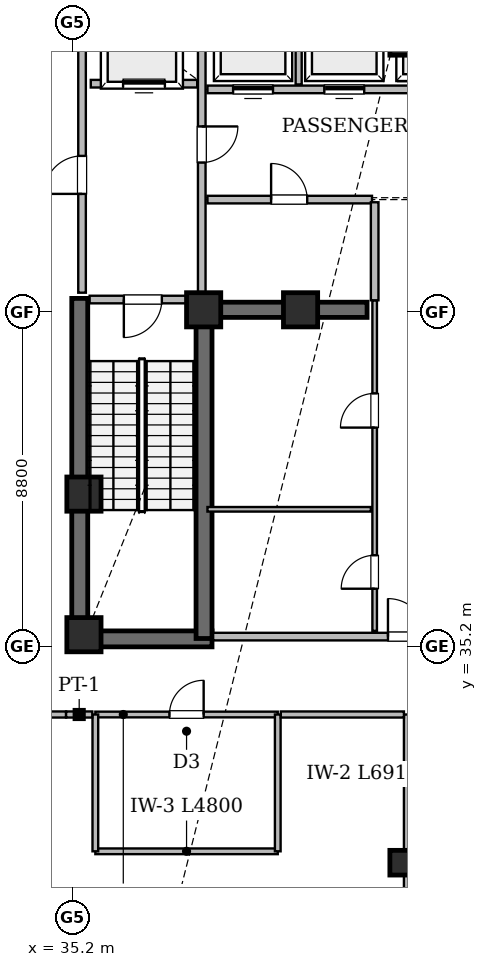
"""IFC4 building model, lengths in metres.
Left out: names, types, materials, properties, quantities, classifications, styles, units other than length and angle.
Written with IfcOpenShell. Run it as: python <this file> out.ifc"""

import sys

from ifc_helpers import new_model, si_unit, direction, frame, frame_2d, origin, origin_2d, place, context, subcontext, project, spatial, rectangle, extrude, element, fill, save


model = new_model("IFC4")
c1 = context("Model", 3, precision=1e-05, world=origin(), true_north=direction((0.0, 1.0)))
c2 = subcontext(c1, "Body", "Model", "MODEL_VIEW")
j1 = project(units=[si_unit("LENGTHUNIT", "METRE"), si_unit("PLANEANGLEUNIT", "RADIAN")], contexts=[c1])
p1 = place(None, origin())
s1 = spatial("IfcSite", under=j1, at=p1, CompositionType="ELEMENT")
p2 = place(p1, origin())
s2 = spatial("IfcBuilding", under=s1, at=p2, CompositionType="ELEMENT")
p3 = place(p2, frame((0.0, 0.0, 295.4)))
s3 = spatial("IfcBuildingStorey", under=s2, at=p3, CompositionType="ELEMENT", Elevation=295.4)
p4 = place(p3, frame((35.18, 35.39, 0.0), z_axis=(0.0, 0.0, 1.0), x_axis=(1.0, 0.0, 0.0)))
e1 = element("IfcWall", 1, at=p4, inside=s3, PredefinedType="SHEAR", context=c2, shape_type="SweptSolid", body=[
    extrude(rectangle(XDim=3.69, YDim=0.42, at=frame_2d((1.845, 0.0))), origin(), (0.0, 0.0, 1.0), 5.14),
])
p5 = place(p3, frame((35.39, 35.18, 0.0), z_axis=(0.0, 0.0, 1.0), x_axis=(0.0, 1.0, 0.0)))
e2 = element("IfcWall", 2, at=p5, inside=s3, PredefinedType="SHEAR", context=c2, shape_type="SweptSolid", body=[
    extrude(rectangle(XDim=9.17, YDim=0.42, at=frame_2d((4.585, 0.0))), origin(), (0.0, 0.0, 1.0), 5.14),
])
p6 = place(p3, frame((38.66, 35.4, 0.0), z_axis=(0.0, 0.0, 1.0), x_axis=(0.0, 1.0, 0.0)))
e3 = element("IfcWall", 3, at=p6, inside=s3, PredefinedType="SHEAR", context=c2, shape_type="SweptSolid", body=[
    extrude(rectangle(XDim=8.95, YDim=0.42, at=frame_2d((4.475, 0.0))), origin(), (0.0, 0.0, 1.0), 5.14),
])
p7 = place(p3, frame((44.0, 50.1, 0.0), z_axis=(0.0, 0.0, 1.0), x_axis=(0.0, 1.0, 0.0)))
e4 = element("IfcWall", 4, at=p7, inside=s3, PredefinedType="SHEAR", context=c2, shape_type="SweptSolid", body=[
    extrude(rectangle(XDim=2.1, YDim=0.4, at=frame_2d((1.05, 0.0))), origin(), (0.0, 0.0, 1.0), 5.14),
])
p8 = place(p3, frame((38.75, 44.05, 0.0), z_axis=(0.0, 0.0, 1.0), x_axis=(1.0, 0.0, 0.0)))
e5 = element("IfcWall", 5, at=p8, inside=s3, PredefinedType="SHEAR", context=c2, shape_type="SweptSolid", body=[
    extrude(rectangle(XDim=4.2, YDim=0.4, at=frame_2d((2.1, 0.0))), origin(), (0.0, 0.0, 1.0), 5.14),
])
for number, where, z_axis, x_axis in (
    (6, (35.5, 35.5, 0.0), (0.0, 0.0, 1.0), (1.0, 0.0, 0.0)),
    (7, (38.65, 44.05, 0.0), (0.0, 0.0, 1.0), (1.0, 0.0, 0.0)),
    (8, (44.0, 51.2, 0.0), (0.0, 0.0, 1.0), (1.0, 0.0, 0.0)),
    (9, (35.5, 39.2, 0.0), (0.0, 0.0, 1.0), (1.0, 0.0, 0.0)),
    (10, (41.2, 44.05, 0.0), (0.0, 0.0, 1.0), (1.0, 0.0, 0.0)),
):
    element("IfcColumn", number, at=place(p3, frame(where, z_axis=z_axis, x_axis=x_axis)), inside=s3, PredefinedType="COLUMN", context=c2, shape_type="SweptSolid", body=[
        extrude(rectangle(XDim=0.9, YDim=0.9, at=origin_2d()), origin(), (0.0, 0.0, 1.0), 5.4),
    ])
p9 = place(p3, frame((44.0, 29.5, 0.0), z_axis=(0.0, 0.0, 1.0), x_axis=(1.0, 0.0, 0.0)))
e11 = element("IfcColumn", 11, at=p9, inside=s3, PredefinedType="COLUMN", context=c2, shape_type="SweptSolid", body=[
    extrude(rectangle(XDim=0.9, YDim=0.65, at=origin_2d()), origin(), (0.0, 0.0, 1.0), 5.4),
])
p10 = place(p3, frame((38.9, 35.45, 0.0), z_axis=(0.0, 0.0, 1.0), x_axis=(1.0, 0.0, 0.0)))
e12 = element("IfcWall", 12, at=p10, inside=s3, PredefinedType="SOLIDWALL", context=c2, shape_type="SweptSolid", body=[
    extrude(rectangle(XDim=10.2, YDim=0.2, at=frame_2d((5.1, 0.0))), origin(), (0.0, 0.0, 1.0), 5.14),
])
p11 = place(p10, frame((4.6, 0.0, 0.0)))
e13 = element("IfcOpeningElement", 13, at=p11, cuts=e12, PredefinedType="OPENING", context=c2, shape_type="SweptSolid", body=[
    extrude(rectangle(XDim=1.0, YDim=2.15, at=frame_2d((0.5, 1.075))), frame((0.0, 0.11, 0.0), z_axis=(0.0, -1.0, 0.0), x_axis=(1.0, 0.0, 0.0)), (0.0, 0.0, 1.0), 0.22),
])
p12 = place(p3, frame((43.15, 35.6, 0.0), z_axis=(0.0, 0.0, 1.0), x_axis=(0.0, 1.0, 0.0)))
e14 = element("IfcWall", 14, at=p12, inside=s3, PredefinedType="PARTITIONING", context=c2, shape_type="SweptSolid", body=[
    extrude(rectangle(XDim=8.7, YDim=0.12, at=frame_2d((4.35, 0.0))), origin(), (0.0, 0.0, 1.0), 5.14),
])
p13 = place(p12, frame((1.11, 0.0, 0.0)))
e15 = element("IfcOpeningElement", 15, at=p13, cuts=e14, PredefinedType="OPENING", context=c2, shape_type="SweptSolid", body=[
    extrude(rectangle(XDim=0.88, YDim=2.1, at=frame_2d((0.44, 1.05))), frame((0.0, 0.07, 0.0), z_axis=(0.0, -1.0, 0.0), x_axis=(1.0, 0.0, 0.0)), (0.0, 0.0, 1.0), 0.14),
])
p14 = place(p12, frame((5.35, 0.0, 0.0)))
e16 = element("IfcOpeningElement", 16, at=p14, cuts=e14, PredefinedType="OPENING", context=c2, shape_type="SweptSolid", body=[
    extrude(rectangle(XDim=0.9, YDim=2.1, at=frame_2d((0.45, 1.05))), frame((0.0, 0.07, 0.0), z_axis=(0.0, -1.0, 0.0), x_axis=(1.0, 0.0, 0.0)), (0.0, 0.0, 1.0), 0.14),
])
p15 = place(p3, frame((35.45, 44.5, 0.0), z_axis=(0.0, 0.0, 1.0), x_axis=(0.0, 1.0, 0.0)))
e17 = element("IfcWall", 17, at=p15, inside=s3, PredefinedType="SOLIDWALL", context=c2, shape_type="SweptSolid", body=[
    extrude(rectangle(XDim=7.92, YDim=0.2, at=frame_2d((3.96, 0.0))), origin(), (0.0, 0.0, 1.0), 5.14),
])
p16 = place(p15, frame((2.6, 0.0, 0.0)))
e18 = element("IfcOpeningElement", 18, at=p16, cuts=e17, PredefinedType="OPENING", context=c2, shape_type="SweptSolid", body=[
    extrude(rectangle(XDim=1.0, YDim=2.15, at=frame_2d((0.5, 1.075))), frame((0.0, 0.11, 0.0), z_axis=(0.0, -1.0, 0.0), x_axis=(1.0, 0.0, 0.0)), (0.0, 0.0, 1.0), 0.22),
])
p17 = place(p3, frame((38.6, 44.5, 0.0), z_axis=(0.0, 0.0, 1.0), x_axis=(0.0, 1.0, 0.0)))
e19 = element("IfcWall", 19, at=p17, inside=s3, PredefinedType="SOLIDWALL", context=c2, shape_type="SweptSolid", body=[
    extrude(rectangle(XDim=7.92, YDim=0.2, at=frame_2d((3.96, 0.0))), origin(), (0.0, 0.0, 1.0), 5.14),
])
p18 = place(p17, frame((3.425, 0.0, 0.0)))
e20 = element("IfcOpeningElement", 20, at=p18, cuts=e19, PredefinedType="OPENING", context=c2, shape_type="SweptSolid", body=[
    extrude(rectangle(XDim=0.95, YDim=2.15, at=frame_2d((0.475, 1.075))), frame((0.0, 0.11, 0.0), z_axis=(0.0, -1.0, 0.0), x_axis=(1.0, 0.0, 0.0)), (0.0, 0.0, 1.0), 0.22),
])
p19 = place(p3, frame((38.75, 49.85, 0.0), z_axis=(0.0, 0.0, 1.0), x_axis=(1.0, 0.0, 0.0)))
e21 = element("IfcWall", 21, at=p19, inside=s3, PredefinedType="SOLIDWALL", context=c2, shape_type="SweptSolid", body=[
    extrude(rectangle(XDim=5.5, YDim=0.2, at=frame_2d((2.75, 0.0))), origin(), (0.0, 0.0, 1.0), 5.14),
])
p20 = place(p19, frame((0.675, 0.0, 0.0)))
e22 = element("IfcOpeningElement", 22, at=p20, cuts=e21, PredefinedType="OPENING", context=c2, shape_type="SweptSolid", body=[
    extrude(rectangle(XDim=1.05, YDim=2.15, at=frame_2d((0.525, 1.075))), frame((0.0, 0.11, 0.0), z_axis=(0.0, -1.0, 0.0), x_axis=(1.0, 0.0, 0.0)), (0.0, 0.0, 1.0), 0.22),
])
p21 = place(p19, frame((3.075, 0.0, 0.0)))
e23 = element("IfcOpeningElement", 23, at=p21, cuts=e21, PredefinedType="OPENING", context=c2, shape_type="SweptSolid", body=[
    extrude(rectangle(XDim=1.05, YDim=2.15, at=frame_2d((0.525, 1.075))), frame((0.0, 0.11, 0.0), z_axis=(0.0, -1.0, 0.0), x_axis=(1.0, 0.0, 0.0)), (0.0, 0.0, 1.0), 0.22),
])
p22 = place(p3, frame((35.8, 33.4, 0.0), z_axis=(0.0, 0.0, 1.0), x_axis=(1.0, 0.0, 0.0)))
e24 = element("IfcWall", 24, at=p22, inside=s3, PredefinedType="PLUMBINGWALL", context=c2, shape_type="SweptSolid", body=[
    extrude(rectangle(XDim=4.8, YDim=0.15, at=frame_2d((2.4, 0.0))), origin(), (0.0, 0.0, 1.0), 4.54),
])
p23 = place(p22, frame((1.95, 0.0, 0.0)))
e25 = element("IfcOpeningElement", 25, at=p23, cuts=e24, PredefinedType="OPENING", context=c2, shape_type="SweptSolid", body=[
    extrude(rectangle(XDim=0.9, YDim=2.1, at=frame_2d((0.45, 1.05))), frame((0.0, 0.085, 0.0), z_axis=(0.0, -1.0, 0.0), x_axis=(1.0, 0.0, 0.0)), (0.0, 0.0, 1.0), 0.17),
])
p24 = place(p3, frame((38.75, 46.95, 0.0), z_axis=(0.0, 0.0, 1.0), x_axis=(1.0, 0.0, 0.0)))
e26 = element("IfcWall", 26, at=p24, inside=s3, PredefinedType="SOLIDWALL", context=c2, shape_type="SweptSolid", body=[
    extrude(rectangle(XDim=4.33, YDim=0.2, at=frame_2d((2.165, 0.0))), origin(), (0.0, 0.0, 1.0), 5.14),
])
p25 = place(p24, frame((1.675, 0.0, 0.0)))
e27 = element("IfcOpeningElement", 27, at=p25, cuts=e26, PredefinedType="OPENING", context=c2, shape_type="SweptSolid", body=[
    extrude(rectangle(XDim=0.95, YDim=2.1, at=frame_2d((0.475, 1.05))), frame((0.0, 0.11, 0.0), z_axis=(0.0, -1.0, 0.0), x_axis=(1.0, 0.0, 0.0)), (0.0, 0.0, 1.0), 0.22),
])
p26 = place(p3, frame((35.65, 44.32, 0.0), z_axis=(0.0, 0.0, 1.0), x_axis=(1.0, 0.0, 0.0)))
e28 = element("IfcWall", 28, at=p26, inside=s3, PredefinedType="SOLIDWALL", context=c2, shape_type="SweptSolid", body=[
    extrude(rectangle(XDim=2.8, YDim=0.2, at=frame_2d((1.4, 0.0))), origin(), (0.0, 0.0, 1.0), 5.14),
])
p27 = place(p26, frame((0.9, 0.0, 0.0)))
e29 = element("IfcOpeningElement", 29, at=p27, cuts=e28, PredefinedType="OPENING", context=c2, shape_type="SweptSolid", body=[
    extrude(rectangle(XDim=1.0, YDim=2.15, at=frame_2d((0.5, 1.075))), frame((0.0, 0.11, 0.0), z_axis=(0.0, -1.0, 0.0), x_axis=(1.0, 0.0, 0.0)), (0.0, 0.0, 1.0), 0.22),
])
p28 = place(p3, frame((35.68, 50.0, 0.0), z_axis=(0.0, 0.0, 1.0), x_axis=(1.0, 0.0, 0.0)))
e30 = element("IfcWall", 30, at=p28, inside=s3, PredefinedType="SOLIDWALL", context=c2, shape_type="SweptSolid", body=[
    extrude(rectangle(XDim=2.8, YDim=0.2, at=frame_2d((1.4, 0.0))), origin(), (0.0, 0.0, 1.0), 5.14),
])
p29 = place(p28, frame((0.85, 0.0, 0.0)))
e31 = element("IfcOpeningElement", 31, at=p29, cuts=e30, PredefinedType="OPENING", context=c2, shape_type="SweptSolid", body=[
    extrude(rectangle(XDim=1.1, YDim=2.15, at=frame_2d((0.55, 1.075))), frame((0.0, 0.11, 0.0), z_axis=(0.0, -1.0, 0.0), x_axis=(1.0, 0.0, 0.0)), (0.0, 0.0, 1.0), 0.22),
])
p30 = place(p3, frame((44.0, 26.49, 0.0), z_axis=(0.0, 0.0, 1.0), x_axis=(0.0, 1.0, 0.0)))
e32 = element("IfcWall", 32, at=p30, inside=s3, PredefinedType="SOLIDWALL", context=c2, shape_type="SweptSolid", body=[
    extrude(rectangle(XDim=6.91, YDim=0.16, at=frame_2d((3.455, 0.0))), origin(), (0.0, 0.0, 1.0), 4.54),
])
p31 = place(p3, frame((35.8, 29.8, 0.0), z_axis=(0.0, 0.0, 1.0), x_axis=(1.0, 0.0, 0.0)))
e33 = element("IfcWall", 33, at=p31, inside=s3, PredefinedType="PLUMBINGWALL", context=c2, shape_type="SweptSolid", body=[
    extrude(rectangle(XDim=4.8, YDim=0.15, at=frame_2d((2.4, 0.0))), origin(), (0.0, 0.0, 1.0), 5.14),
])
p32 = place(p3, frame((38.75, 38.8, 0.0), z_axis=(0.0, 0.0, 1.0), x_axis=(1.0, 0.0, 0.0)))
e34 = element("IfcWall", 34, at=p32, inside=s3, PredefinedType="PARTITIONING", context=c2, shape_type="SweptSolid", body=[
    extrude(rectangle(XDim=4.3, YDim=0.12, at=frame_2d((2.15, 0.0))), origin(), (0.0, 0.0, 1.0), 5.14),
])
p33 = place(p3, frame((35.8, 33.4, 0.0), z_axis=(0.0, 0.0, 1.0), x_axis=(0.0, -1.0, 0.0)))
e35 = element("IfcWall", 35, at=p33, inside=s3, PredefinedType="PLUMBINGWALL", context=c2, shape_type="SweptSolid", body=[
    extrude(rectangle(XDim=3.6, YDim=0.15, at=frame_2d((1.8, 0.0))), origin(), (0.0, 0.0, 1.0), 5.14),
])
p34 = place(p3, frame((40.6, 29.8, 0.0), z_axis=(0.0, 0.0, 1.0), x_axis=(0.0, 1.0, 0.0)))
e36 = element("IfcWall", 36, at=p34, inside=s3, PredefinedType="PLUMBINGWALL", context=c2, shape_type="SweptSolid", body=[
    extrude(rectangle(XDim=3.6, YDim=0.15, at=frame_2d((1.8, 0.0))), origin(), (0.0, 0.0, 1.0), 4.54),
])
p35 = place(p3, frame((40.68, 33.4, 0.0), z_axis=(0.0, 0.0, 1.0), x_axis=(1.0, 0.0, 0.0)))
e37 = element("IfcWall", 37, at=p35, inside=s3, PredefinedType="SOLIDWALL", context=c2, shape_type="SweptSolid", body=[
    extrude(rectangle(XDim=3.24, YDim=0.16, at=frame_2d((1.62, 0.0))), origin(), (0.0, 0.0, 1.0), 5.14),
])
p36 = place(p3, frame((43.15, 44.3, 0.0), z_axis=(0.0, 0.0, 1.0), x_axis=(0.0, 1.0, 0.0)))
e38 = element("IfcWall", 38, at=p36, inside=s3, PredefinedType="SOLIDWALL", context=c2, shape_type="SweptSolid", body=[
    extrude(rectangle(XDim=2.58, YDim=0.2, at=frame_2d((1.29, 0.0))), origin(), (0.0, 0.0, 1.0), 5.14),
])
p37 = place(p3, frame((41.15, 49.98, 0.0), z_axis=(0.0, 0.0, 1.0), x_axis=(0.0, 1.0, 0.0)))
e39 = element("IfcWall", 39, at=p37, inside=s3, PredefinedType="SOLIDWALL", context=c2, shape_type="SweptSolid", body=[
    extrude(rectangle(XDim=2.37, YDim=0.16, at=frame_2d((1.185, 0.0))), origin(), (0.0, 0.0, 1.0), 5.14),
])
p38 = place(p3, frame((33.48, 33.4, 0.0), z_axis=(0.0, 0.0, 1.0), x_axis=(1.0, 0.0, 0.0)))
e40 = element("IfcWall", 40, at=p38, inside=s3, PredefinedType="SOLIDWALL", context=c2, shape_type="SweptSolid", body=[
    extrude(rectangle(XDim=1.55, YDim=0.16, at=frame_2d((0.775, 0.0))), origin(), (0.0, 0.0, 1.0), 5.14),
])
p39 = place(p3, frame((35.03, 33.4, 0.0), z_axis=(0.0, 0.0, 1.0), x_axis=(1.0, 0.0, 0.0)))
e41 = element("IfcWall", 41, at=p39, inside=s3, PredefinedType="SOLIDWALL", context=c2, shape_type="SweptSolid", body=[
    extrude(rectangle(XDim=0.69, YDim=0.16, at=frame_2d((0.345, 0.0))), origin(), (0.0, 0.0, 1.0), 5.14),
])
p40 = place(p27, frame((1.0, 0.0, 0.0), z_axis=(0.0, 0.0, 1.0), x_axis=(-1.0, 0.0, 0.0)))
e42 = element("IfcDoor", 42, at=p40, inside=s3, OperationType="SINGLE_SWING_LEFT", PredefinedType="DOOR", context=c2, shape_type="SweptSolid", body=[
    extrude(rectangle(XDim=1.0, YDim=2.15, at=frame_2d((0.5, 1.075))), frame((0.0, 0.025, 0.0), z_axis=(0.0, -1.0, 0.0), x_axis=(1.0, 0.0, 0.0)), (0.0, 0.0, 1.0), 0.05),
])
fill(e29, e42)
p41 = place(p16, origin())
e43 = element("IfcDoor", 43, at=p41, inside=s3, OperationType="SINGLE_SWING_LEFT", PredefinedType="DOOR", context=c2, shape_type="SweptSolid", body=[
    extrude(rectangle(XDim=1.0, YDim=2.15, at=frame_2d((0.5, 1.075))), frame((0.0, 0.025, 0.0), z_axis=(0.0, -1.0, 0.0), x_axis=(1.0, 0.0, 0.0)), (0.0, 0.0, 1.0), 0.05),
])
fill(e18, e43)
p42 = place(p18, frame((0.95, 0.0, 0.0), z_axis=(0.0, 0.0, 1.0), x_axis=(-1.0, 0.0, 0.0)))
e44 = element("IfcDoor", 44, at=p42, inside=s3, OperationType="SINGLE_SWING_RIGHT", PredefinedType="DOOR", context=c2, shape_type="SweptSolid", body=[
    extrude(rectangle(XDim=0.95, YDim=2.15, at=frame_2d((0.475, 1.075))), frame((0.0, 0.025, 0.0), z_axis=(0.0, -1.0, 0.0), x_axis=(1.0, 0.0, 0.0)), (0.0, 0.0, 1.0), 0.05),
])
fill(e20, e44)
p43 = place(p29, origin())
e45 = element("IfcDoor", 45, at=p43, inside=s3, OperationType="SLIDING_TO_LEFT", PredefinedType="DOOR", context=c2, shape_type="SweptSolid", body=[
    extrude(rectangle(XDim=1.1, YDim=2.15, at=frame_2d((0.55, 1.075))), frame((0.0, 0.025, 0.0), z_axis=(0.0, -1.0, 0.0), x_axis=(1.0, 0.0, 0.0)), (0.0, 0.0, 1.0), 0.05),
])
fill(e31, e45)
p44 = place(p11, origin())
e46 = element("IfcDoor", 46, at=p44, inside=s3, OperationType="SINGLE_SWING_LEFT", PredefinedType="DOOR", context=c2, shape_type="SweptSolid", body=[
    extrude(rectangle(XDim=1.0, YDim=2.15, at=frame_2d((0.5, 1.075))), frame((0.0, 0.025, 0.0), z_axis=(0.0, -1.0, 0.0), x_axis=(1.0, 0.0, 0.0)), (0.0, 0.0, 1.0), 0.05),
])
fill(e13, e46)
p45 = place(p20, origin())
e47 = element("IfcDoor", 47, at=p45, inside=s3, OperationType="SLIDING_TO_LEFT", PredefinedType="DOOR", context=c2, shape_type="SweptSolid", body=[
    extrude(rectangle(XDim=1.05, YDim=2.15, at=frame_2d((0.525, 1.075))), frame((0.0, 0.025, 0.0), z_axis=(0.0, -1.0, 0.0), x_axis=(1.0, 0.0, 0.0)), (0.0, 0.0, 1.0), 0.05),
])
fill(e22, e47)
p46 = place(p21, origin())
e48 = element("IfcDoor", 48, at=p46, inside=s3, OperationType="SLIDING_TO_LEFT", PredefinedType="DOOR", context=c2, shape_type="SweptSolid", body=[
    extrude(rectangle(XDim=1.05, YDim=2.15, at=frame_2d((0.525, 1.075))), frame((0.0, 0.025, 0.0), z_axis=(0.0, -1.0, 0.0), x_axis=(1.0, 0.0, 0.0)), (0.0, 0.0, 1.0), 0.05),
])
fill(e23, e48)
p47 = place(p25, origin())
e49 = element("IfcDoor", 49, at=p47, inside=s3, OperationType="SINGLE_SWING_LEFT", PredefinedType="DOOR", context=c2, shape_type="SweptSolid", body=[
    extrude(rectangle(XDim=0.95, YDim=2.1, at=frame_2d((0.475, 1.05))), frame((0.0, 0.025, 0.0), z_axis=(0.0, -1.0, 0.0), x_axis=(1.0, 0.0, 0.0)), (0.0, 0.0, 1.0), 0.05),
])
fill(e27, e49)
p48 = place(p13, origin())
e50 = element("IfcDoor", 50, at=p48, inside=s3, OperationType="SINGLE_SWING_LEFT", PredefinedType="DOOR", context=c2, shape_type="SweptSolid", body=[
    extrude(rectangle(XDim=0.88, YDim=2.1, at=frame_2d((0.44, 1.05))), frame((0.0, 0.025, 0.0), z_axis=(0.0, -1.0, 0.0), x_axis=(1.0, 0.0, 0.0)), (0.0, 0.0, 1.0), 0.05),
])
fill(e15, e50)
p49 = place(p14, origin())
e51 = element("IfcDoor", 51, at=p49, inside=s3, OperationType="SINGLE_SWING_LEFT", PredefinedType="DOOR", context=c2, shape_type="SweptSolid", body=[
    extrude(rectangle(XDim=0.9, YDim=2.1, at=frame_2d((0.45, 1.05))), frame((0.0, 0.025, 0.0), z_axis=(0.0, -1.0, 0.0), x_axis=(1.0, 0.0, 0.0)), (0.0, 0.0, 1.0), 0.05),
])
fill(e16, e51)
p50 = place(p23, origin())
e52 = element("IfcDoor", 52, at=p50, inside=s3, OperationType="SINGLE_SWING_RIGHT", PredefinedType="DOOR", context=c2, shape_type="SweptSolid", body=[
    extrude(rectangle(XDim=0.9, YDim=2.1, at=frame_2d((0.45, 1.05))), frame((0.0, 0.025, 0.0), z_axis=(0.0, -1.0, 0.0), x_axis=(1.0, 0.0, 0.0)), (0.0, 0.0, 1.0), 0.05),
])
fill(e25, e52)
save(model, sys.argv[1])
